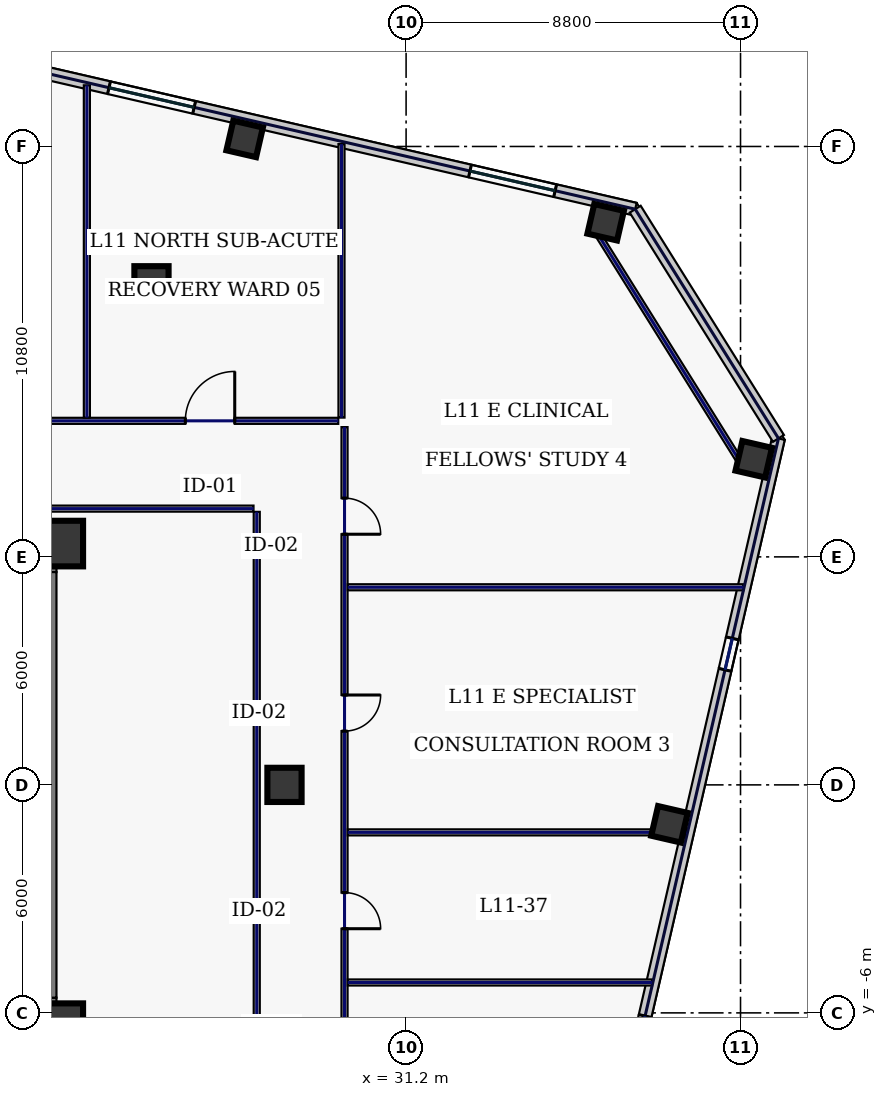
"""IFC4 building model, lengths in metres.
Left out: names, types, materials, properties, quantities, classifications, styles, units other than length and angle.
Written with IfcOpenShell. Run it as: python <this file> out.ifc"""

import sys

from ifc_helpers import new_model, si_unit, direction, frame, frame_2d, origin, origin_2d, place, context, subcontext, project, spatial, rectangle, hollow_rectangle, extrude, element, fill, save


model = new_model("IFC4")
c1 = context("Model", 3, precision=1e-05, world=origin(), true_north=direction((0.0, 1.0)))
c2 = subcontext(c1, "Body", "Model", "MODEL_VIEW")
j1 = project(units=[si_unit("LENGTHUNIT", "METRE"), si_unit("PLANEANGLEUNIT", "RADIAN")], contexts=[c1])
p1 = place(None, origin())
s1 = spatial("IfcSite", under=j1, at=p1, CompositionType="ELEMENT")
p2 = place(p1, origin())
s2 = spatial("IfcBuilding", under=s1, at=p2, CompositionType="ELEMENT")
p3 = place(p2, frame((0.0, 0.0, 55.4)))
s3 = spatial("IfcBuildingStorey", under=s2, at=p3, CompositionType="ELEMENT", Elevation=55.4)
for number, where, z_axis, x_axis in (
    (1, (10.4, 6.0, 0.0), (0.0, 0.0, 1.0), (1.0, 0.0, 0.0)),
    (2, (10.4, -6.0, 0.0), (0.0, 0.0, 1.0), (1.0, 0.0, 0.0)),
):
    element("IfcWall", number, at=place(p3, frame(where, z_axis=z_axis, x_axis=x_axis)), inside=s3, PredefinedType="SHEAR", context=c2, shape_type="SweptSolid", body=[
        extrude(rectangle(XDim=11.6, YDim=0.8, at=frame_2d((5.8, 0.0))), origin(), (0.0, 0.0, 1.0), 3.74),
    ])
p4 = place(p3, frame((21.6, -5.6, 0.0), z_axis=(0.0, 0.0, 1.0), x_axis=(0.0, 1.0, 0.0)))
e3 = element("IfcWall", 3, at=p4, inside=s3, PredefinedType="SHEAR", context=c2, shape_type="SweptSolid", body=[
    extrude(rectangle(XDim=11.2, YDim=0.8, at=frame_2d((5.6, 0.0))), origin(), (0.0, 0.0, 1.0), 3.74),
])
for number, where, z_axis, x_axis in (
    (4, (22.1, -6.35, 0.0), (0.0, 0.0, 1.0), (1.0, 0.0, 0.0)),
    (5, (22.1, 6.35, 0.0), (0.0, 0.0, 1.0), (1.0, 0.0, 0.0)),
):
    element("IfcColumn", number, at=place(p3, frame(where, z_axis=z_axis, x_axis=x_axis)), inside=s3, PredefinedType="COLUMN", context=c2, shape_type="SweptSolid", body=[
        extrude(hollow_rectangle(XDim=1.2, YDim=1.2, WallThickness=0.05, at=origin_2d()), origin(), (0.0, 0.0, 1.0), 3.74),
    ])
for number, where, z_axis, x_axis in (
    (6, (24.5, 13.2, 0.0), (0.0, 0.0, 1.0), (1.0, 0.0, 0.0)),
    (7, (28.0, 0.0, 0.0), (0.0, 0.0, 1.0), (1.0, 0.0, 0.0)),
):
    element("IfcColumn", number, at=place(p3, frame(where, z_axis=z_axis, x_axis=x_axis)), inside=s3, PredefinedType="COLUMN", context=c2, shape_type="SweptSolid", body=[
        extrude(hollow_rectangle(XDim=0.9, YDim=0.9, WallThickness=0.04, at=origin_2d()), origin(), (0.0, 0.0, 1.0), 3.74),
    ])
for number, where, z_axis, x_axis in (
    (8, (36.451, 14.806, 0.0), (0.0, 0.0, 1.0), (0.974, -0.225, 0.0)),
    (9, (26.952, 16.999, 0.0), (0.0, 0.0, 1.0), (0.974, -0.225, 0.0)),
    (10, (38.13, -1.038, 0.0), (0.0, 0.0, 1.0), (0.974, -0.225, 0.0)),
    (11, (40.348, 8.57, 0.0), (0.0, 0.0, 1.0), (0.974, -0.225, 0.0)),
):
    element("IfcColumn", number, at=place(p3, frame(where, z_axis=z_axis, x_axis=x_axis)), inside=s3, PredefinedType="COLUMN", context=c2, shape_type="SweptSolid", body=[
        extrude(hollow_rectangle(XDim=0.8, YDim=0.8, WallThickness=0.036, at=origin_2d()), origin(), (0.0, 0.0, 1.0), 3.74),
    ])
p5 = place(p3, frame((37.229, 15.15, 0.0), z_axis=(0.0, 0.0, 1.0), x_axis=(-0.97436993772, 0.224951604723, 0.0)))
e12 = element("IfcWall", 12, at=p5, inside=s3, PredefinedType="STANDARD", context=c2, shape_type="SweptSolid", body=[
    extrude(rectangle(XDim=22.651, YDim=0.34, at=frame_2d((11.326, 0.0))), origin(), (0.0, 0.0, 1.0), 3.74),
])
p6 = place(p5, frame((16.395, 0.0, 0.77)))
e13 = element("IfcOpeningElement", 13, at=p6, cuts=e12, PredefinedType="OPENING", context=c2, shape_type="SweptSolid", body=[
    extrude(rectangle(XDim=2.3, YDim=2.1, at=frame_2d((1.15, 1.05))), frame((0.0, 0.18, 0.0), z_axis=(0.0, -1.0, 0.0), x_axis=(1.0, 0.0, 0.0)), (0.0, 0.0, 1.0), 0.36),
])
p7 = place(p5, frame((11.911, 0.0, 0.77)))
e14 = element("IfcOpeningElement", 14, at=p7, cuts=e12, PredefinedType="OPENING", context=c2, shape_type="SweptSolid", body=[
    extrude(rectangle(XDim=2.3, YDim=2.1, at=frame_2d((1.15, 1.05))), frame((0.0, 0.18, 0.0), z_axis=(0.0, -1.0, 0.0), x_axis=(1.0, 0.0, 0.0)), (0.0, 0.0, 1.0), 0.36),
])
p8 = place(p5, frame((2.162, 0.0, 0.77)))
e15 = element("IfcOpeningElement", 15, at=p8, cuts=e12, PredefinedType="OPENING", context=c2, shape_type="SweptSolid", body=[
    extrude(rectangle(XDim=2.3, YDim=2.1, at=frame_2d((1.15, 1.05))), frame((0.0, 0.18, 0.0), z_axis=(0.0, -1.0, 0.0), x_axis=(1.0, 0.0, 0.0)), (0.0, 0.0, 1.0), 0.36),
])
p9 = place(p3, frame((31.82, -30.637, 0.0), z_axis=(0.0, 0.0, 1.0), x_axis=(0.224949969076, 0.974370315338, 0.0)))
e16 = element("IfcWall", 16, at=p9, inside=s3, PredefinedType="STANDARD", context=c2, shape_type="SweptSolid", body=[
    extrude(rectangle(XDim=40.8, YDim=0.34, at=frame_2d((20.4, 0.0))), origin(), (0.0, 0.0, 1.0), 3.74),
])
p10 = place(p9, frame((4.3, 0.0, 0.58)))
e17 = element("IfcOpeningElement", 17, at=p10, cuts=e16, PredefinedType="OPENING", context=c2, shape_type="SweptSolid", body=[
    extrude(rectangle(XDim=1.6, YDim=2.3, at=frame_2d((0.8, 1.15))), frame((0.0, 0.18, 0.0), z_axis=(0.0, -1.0, 0.0), x_axis=(1.0, 0.0, 0.0)), (0.0, 0.0, 1.0), 0.36),
])
p11 = place(p9, frame((14.5, 0.0, 0.58)))
e18 = element("IfcOpeningElement", 18, at=p11, cuts=e16, PredefinedType="OPENING", context=c2, shape_type="SweptSolid", body=[
    extrude(rectangle(XDim=1.6, YDim=2.3, at=frame_2d((0.8, 1.15))), frame((0.0, 0.18, 0.0), z_axis=(0.0, -1.0, 0.0), x_axis=(1.0, 0.0, 0.0)), (0.0, 0.0, 1.0), 0.36),
])
p12 = place(p9, frame((24.35, 0.0, 0.75)))
e19 = element("IfcOpeningElement", 19, at=p12, cuts=e16, PredefinedType="OPENING", context=c2, shape_type="SweptSolid", body=[
    extrude(rectangle(XDim=0.85, YDim=1.85, at=frame_2d((0.425, 0.925))), frame((0.0, 0.18, 0.0), z_axis=(0.0, -1.0, 0.0), x_axis=(1.0, 0.0, 0.0)), (0.0, 0.0, 1.0), 0.36),
])
p13 = place(p9, frame((34.55, 0.0, 0.75)))
e20 = element("IfcOpeningElement", 20, at=p13, cuts=e16, PredefinedType="OPENING", context=c2, shape_type="SweptSolid", body=[
    extrude(rectangle(XDim=0.85, YDim=1.85, at=frame_2d((0.425, 0.925))), frame((0.0, 0.18, 0.0), z_axis=(0.0, -1.0, 0.0), x_axis=(1.0, 0.0, 0.0)), (0.0, 0.0, 1.0), 0.36),
])
p14 = place(p3, frame((40.998, 9.117, 0.0), z_axis=(0.0, 0.0, 1.0), x_axis=(-0.529921811158, 0.848046504656, 0.0)))
e21 = element("IfcWall", 21, at=p14, inside=s3, PredefinedType="STANDARD", context=c2, shape_type="SweptSolid", body=[
    extrude(rectangle(XDim=7.113, YDim=0.34, at=frame_2d((3.557, 0.0))), origin(), (0.0, 0.0, 1.0), 3.74),
])
p15 = place(p3, frame((40.06, 8.389, 0.0), z_axis=(0.0, 0.0, 1.0), x_axis=(-0.529927317139, 0.848043064089, 0.0)))
e22 = element("IfcWall", 22, at=p15, inside=s3, PredefinedType="PARTITIONING", context=c2, shape_type="SweptSolid", body=[
    extrude(rectangle(XDim=7.354, YDim=0.16, at=frame_2d((3.677, 0.0))), origin(), (0.0, 0.0, 1.0), 3.74),
])
p16 = place(p3, frame((-18.235, 9.58, 0.0), z_axis=(0.0, 0.0, 1.0), x_axis=(1.0, 0.0, 0.0)))
e23 = element("IfcWall", 23, at=p16, inside=s3, PredefinedType="PARTITIONING", context=c2, shape_type="SweptSolid", body=[
    extrude(rectangle(XDim=47.65, YDim=0.16, at=frame_2d((23.825, 0.0))), origin(), (0.0, 0.0, 1.0), 3.74),
])
p17 = place(p16, frame((2.854, 0.0, 0.0)))
e24 = element("IfcOpeningElement", 24, at=p17, cuts=e23, PredefinedType="OPENING", context=c2, shape_type="SweptSolid", body=[
    extrude(rectangle(XDim=0.95, YDim=2.2, at=frame_2d((0.475, 1.1))), frame((0.0, 0.09, 0.0), z_axis=(0.0, -1.0, 0.0), x_axis=(1.0, 0.0, 0.0)), (0.0, 0.0, 1.0), 0.18),
])
p18 = place(p16, frame((9.52, 0.0, 0.0)))
e25 = element("IfcOpeningElement", 25, at=p18, cuts=e23, PredefinedType="OPENING", context=c2, shape_type="SweptSolid", body=[
    extrude(rectangle(XDim=1.05, YDim=2.2, at=frame_2d((0.525, 1.1))), frame((0.0, 0.09, 0.0), z_axis=(0.0, -1.0, 0.0), x_axis=(1.0, 0.0, 0.0)), (0.0, 0.0, 1.0), 0.18),
])
p19 = place(p16, frame((17.42, 0.0, 0.0)))
e26 = element("IfcOpeningElement", 26, at=p19, cuts=e23, PredefinedType="OPENING", context=c2, shape_type="SweptSolid", body=[
    extrude(rectangle(XDim=0.95, YDim=2.2, at=frame_2d((0.475, 1.1))), frame((0.0, 0.09, 0.0), z_axis=(0.0, -1.0, 0.0), x_axis=(1.0, 0.0, 0.0)), (0.0, 0.0, 1.0), 0.18),
])
p20 = place(p16, frame((25.32, 0.0, 0.0)))
e27 = element("IfcOpeningElement", 27, at=p20, cuts=e23, PredefinedType="OPENING", context=c2, shape_type="SweptSolid", body=[
    extrude(rectangle(XDim=0.95, YDim=2.2, at=frame_2d((0.475, 1.1))), frame((0.0, 0.09, 0.0), z_axis=(0.0, -1.0, 0.0), x_axis=(1.0, 0.0, 0.0)), (0.0, 0.0, 1.0), 0.18),
])
p21 = place(p16, frame((34.67, 0.0, 0.0)))
e28 = element("IfcOpeningElement", 28, at=p21, cuts=e23, PredefinedType="OPENING", context=c2, shape_type="SweptSolid", body=[
    extrude(rectangle(XDim=1.3, YDim=2.2, at=frame_2d((0.65, 1.1))), frame((0.0, 0.09, 0.0), z_axis=(0.0, -1.0, 0.0), x_axis=(1.0, 0.0, 0.0)), (0.0, 0.0, 1.0), 0.18),
])
p22 = place(p16, frame((43.626, 0.0, 0.0)))
e29 = element("IfcOpeningElement", 29, at=p22, cuts=e23, PredefinedType="OPENING", context=c2, shape_type="SweptSolid", body=[
    extrude(rectangle(XDim=1.3, YDim=2.2, at=frame_2d((0.65, 1.1))), frame((0.0, 0.09, 0.0), z_axis=(0.0, -1.0, 0.0), x_axis=(1.0, 0.0, 0.0)), (0.0, 0.0, 1.0), 0.18),
])
p23 = place(p3, frame((29.58, 9.415, 0.0), z_axis=(0.0, 0.0, 1.0), x_axis=(0.0, -1.0, 0.0)))
e30 = element("IfcWall", 30, at=p23, inside=s3, PredefinedType="PARTITIONING", context=c2, shape_type="SweptSolid", body=[
    extrude(rectangle(XDim=18.63, YDim=0.16, at=frame_2d((9.315, 0.0))), origin(), (0.0, 0.0, 1.0), 3.74),
])
p24 = place(p23, frame((16.081, 0.0, 0.0)))
e31 = element("IfcOpeningElement", 31, at=p24, cuts=e30, PredefinedType="OPENING", context=c2, shape_type="SweptSolid", body=[
    extrude(rectangle(XDim=0.95, YDim=2.2, at=frame_2d((0.475, 1.1))), frame((0.0, 0.09, 0.0), z_axis=(0.0, -1.0, 0.0), x_axis=(1.0, 0.0, 0.0)), (0.0, 0.0, 1.0), 0.18),
])
p25 = place(p23, frame((12.25, 0.0, 0.0)))
e32 = element("IfcOpeningElement", 32, at=p25, cuts=e30, PredefinedType="OPENING", context=c2, shape_type="SweptSolid", body=[
    extrude(rectangle(XDim=0.95, YDim=2.2, at=frame_2d((0.475, 1.1))), frame((0.0, 0.09, 0.0), z_axis=(0.0, -1.0, 0.0), x_axis=(1.0, 0.0, 0.0)), (0.0, 0.0, 1.0), 0.18),
])
p26 = place(p23, frame((7.05, 0.0, 0.0)))
e33 = element("IfcOpeningElement", 33, at=p26, cuts=e30, PredefinedType="OPENING", context=c2, shape_type="SweptSolid", body=[
    extrude(rectangle(XDim=0.95, YDim=2.2, at=frame_2d((0.475, 1.1))), frame((0.0, 0.09, 0.0), z_axis=(0.0, -1.0, 0.0), x_axis=(1.0, 0.0, 0.0)), (0.0, 0.0, 1.0), 0.18),
])
p27 = place(p23, frame((1.869, 0.0, 0.0)))
e34 = element("IfcOpeningElement", 34, at=p27, cuts=e30, PredefinedType="OPENING", context=c2, shape_type="SweptSolid", body=[
    extrude(rectangle(XDim=0.95, YDim=2.2, at=frame_2d((0.475, 1.1))), frame((0.0, 0.09, 0.0), z_axis=(0.0, -1.0, 0.0), x_axis=(1.0, 0.0, 0.0)), (0.0, 0.0, 1.0), 0.18),
])
p28 = place(p3, frame((27.185, 7.27, 0.0), z_axis=(0.0, 0.0, 1.0), x_axis=(-1.0, 0.0, 0.0)))
e35 = element("IfcWall", 35, at=p28, inside=s3, PredefinedType="PARTITIONING", context=c2, shape_type="SweptSolid", body=[
    extrude(rectangle(XDim=16.52, YDim=0.16, at=frame_2d((8.26, 0.0))), origin(), (0.0, 0.0, 1.0), 3.74),
])
p29 = place(p3, frame((27.27, -6.985, 0.0), z_axis=(0.0, 0.0, 1.0), x_axis=(0.0, 1.0, 0.0)))
e36 = element("IfcWall", 36, at=p29, inside=s3, PredefinedType="PARTITIONING", context=c2, shape_type="SweptSolid", body=[
    extrude(rectangle(XDim=14.17, YDim=0.16, at=frame_2d((7.085, 0.0))), origin(), (0.0, 0.0, 1.0), 3.74),
])
p30 = place(p3, frame((29.5, 9.665, 0.0), z_axis=(0.0, 0.0, 1.0), x_axis=(0.0, 1.0, 0.0)))
e37 = element("IfcWall", 37, at=p30, inside=s3, PredefinedType="PARTITIONING", context=c2, shape_type="SweptSolid", body=[
    extrude(rectangle(XDim=7.197, YDim=0.16, at=frame_2d((3.599, 0.0))), origin(), (0.0, 0.0, 1.0), 3.74),
])
p31 = place(p3, frame((22.8, 9.665, 0.0), z_axis=(0.0, 0.0, 1.0), x_axis=(0.0, 1.0, 0.0)))
e38 = element("IfcWall", 38, at=p31, inside=s3, PredefinedType="PARTITIONING", context=c2, shape_type="SweptSolid", body=[
    extrude(rectangle(XDim=8.744, YDim=0.16, at=frame_2d((4.372, 0.0))), origin(), (0.0, 0.0, 1.0), 3.74),
])
p32 = place(p3, frame((29.665, -5.2, 0.0), z_axis=(0.0, 0.0, 1.0), x_axis=(1.0, 0.0, 0.0)))
e39 = element("IfcWall", 39, at=p32, inside=s3, PredefinedType="PARTITIONING", context=c2, shape_type="SweptSolid", body=[
    extrude(rectangle(XDim=8.007, YDim=0.16, at=frame_2d((4.003, 0.0))), origin(), (0.0, 0.0, 1.0), 3.74),
])
p33 = place(p3, frame((29.665, -1.25, 0.0), z_axis=(0.0, 0.0, 1.0), x_axis=(1.0, 0.0, 0.0)))
e40 = element("IfcWall", 40, at=p33, inside=s3, PredefinedType="PARTITIONING", context=c2, shape_type="SweptSolid", body=[
    extrude(rectangle(XDim=8.919, YDim=0.16, at=frame_2d((4.459, 0.0))), origin(), (0.0, 0.0, 1.0), 3.74),
])
p34 = place(p3, frame((29.665, 5.2, 0.0), z_axis=(0.0, 0.0, 1.0), x_axis=(1.0, 0.0, 0.0)))
e41 = element("IfcWall", 41, at=p34, inside=s3, PredefinedType="PARTITIONING", context=c2, shape_type="SweptSolid", body=[
    extrude(rectangle(XDim=10.408, YDim=0.16, at=frame_2d((5.204, 0.0))), origin(), (0.0, 0.0, 1.0), 3.74),
])
p35 = place(p7, origin())
e42 = element("IfcWindow", 42, at=p35, inside=s3, PartitioningType="SINGLE_PANEL", PredefinedType="WINDOW", context=c2, shape_type="SweptSolid", body=[
    extrude(rectangle(XDim=2.3, YDim=2.1, at=frame_2d((1.15, 1.05))), frame((0.0, 0.03, 0.0), z_axis=(0.0, -1.0, 0.0), x_axis=(1.0, 0.0, 0.0)), (0.0, 0.0, 1.0), 0.06),
])
fill(e14, e42)
p36 = place(p8, origin())
e43 = element("IfcWindow", 43, at=p36, inside=s3, PartitioningType="SINGLE_PANEL", PredefinedType="WINDOW", context=c2, shape_type="SweptSolid", body=[
    extrude(rectangle(XDim=2.3, YDim=2.1, at=frame_2d((1.15, 1.05))), frame((0.0, 0.03, 0.0), z_axis=(0.0, -1.0, 0.0), x_axis=(1.0, 0.0, 0.0)), (0.0, 0.0, 1.0), 0.06),
])
fill(e15, e43)
p37 = place(p12, origin())
e44 = element("IfcWindow", 44, at=p37, inside=s3, PartitioningType="SINGLE_PANEL", PredefinedType="WINDOW", context=c2, shape_type="SweptSolid", body=[
    extrude(rectangle(XDim=0.85, YDim=1.85, at=frame_2d((0.425, 0.925))), frame((0.0, 0.03, 0.0), z_axis=(0.0, -1.0, 0.0), x_axis=(1.0, 0.0, 0.0)), (0.0, 0.0, 1.0), 0.06),
])
fill(e19, e44)
p38 = place(p13, origin())
e45 = element("IfcWindow", 45, at=p38, inside=s3, PartitioningType="SINGLE_PANEL", PredefinedType="WINDOW", context=c2, shape_type="SweptSolid", body=[
    extrude(rectangle(XDim=0.85, YDim=1.85, at=frame_2d((0.425, 0.925))), frame((0.0, 0.03, 0.0), z_axis=(0.0, -1.0, 0.0), x_axis=(1.0, 0.0, 0.0)), (0.0, 0.0, 1.0), 0.06),
])
fill(e20, e45)
p39 = place(p22, origin())
e46 = element("IfcDoor", 46, at=p39, inside=s3, OperationType="SINGLE_SWING_RIGHT", PredefinedType="DOOR", context=c2, shape_type="SweptSolid", body=[
    extrude(rectangle(XDim=1.3, YDim=2.2, at=frame_2d((0.65, 1.1))), frame((0.0, 0.025, 0.0), z_axis=(0.0, -1.0, 0.0), x_axis=(1.0, 0.0, 0.0)), (0.0, 0.0, 1.0), 0.05),
])
fill(e29, e46)
p40 = place(p25, origin())
e47 = element("IfcDoor", 47, at=p40, inside=s3, OperationType="SINGLE_SWING_RIGHT", PredefinedType="DOOR", context=c2, shape_type="SweptSolid", body=[
    extrude(rectangle(XDim=0.95, YDim=2.2, at=frame_2d((0.475, 1.1))), frame((0.0, 0.025, 0.0), z_axis=(0.0, -1.0, 0.0), x_axis=(1.0, 0.0, 0.0)), (0.0, 0.0, 1.0), 0.05),
])
fill(e32, e47)
p41 = place(p26, origin())
e48 = element("IfcDoor", 48, at=p41, inside=s3, OperationType="SINGLE_SWING_LEFT", PredefinedType="DOOR", context=c2, shape_type="SweptSolid", body=[
    extrude(rectangle(XDim=0.95, YDim=2.2, at=frame_2d((0.475, 1.1))), frame((0.0, 0.025, 0.0), z_axis=(0.0, -1.0, 0.0), x_axis=(1.0, 0.0, 0.0)), (0.0, 0.0, 1.0), 0.05),
])
fill(e33, e48)
p42 = place(p27, origin())
e49 = element("IfcDoor", 49, at=p42, inside=s3, OperationType="SINGLE_SWING_RIGHT", PredefinedType="DOOR", context=c2, shape_type="SweptSolid", body=[
    extrude(rectangle(XDim=0.95, YDim=2.2, at=frame_2d((0.475, 1.1))), frame((0.0, 0.025, 0.0), z_axis=(0.0, -1.0, 0.0), x_axis=(1.0, 0.0, 0.0)), (0.0, 0.0, 1.0), 0.05),
])
fill(e34, e49)
save(model, sys.argv[1])
